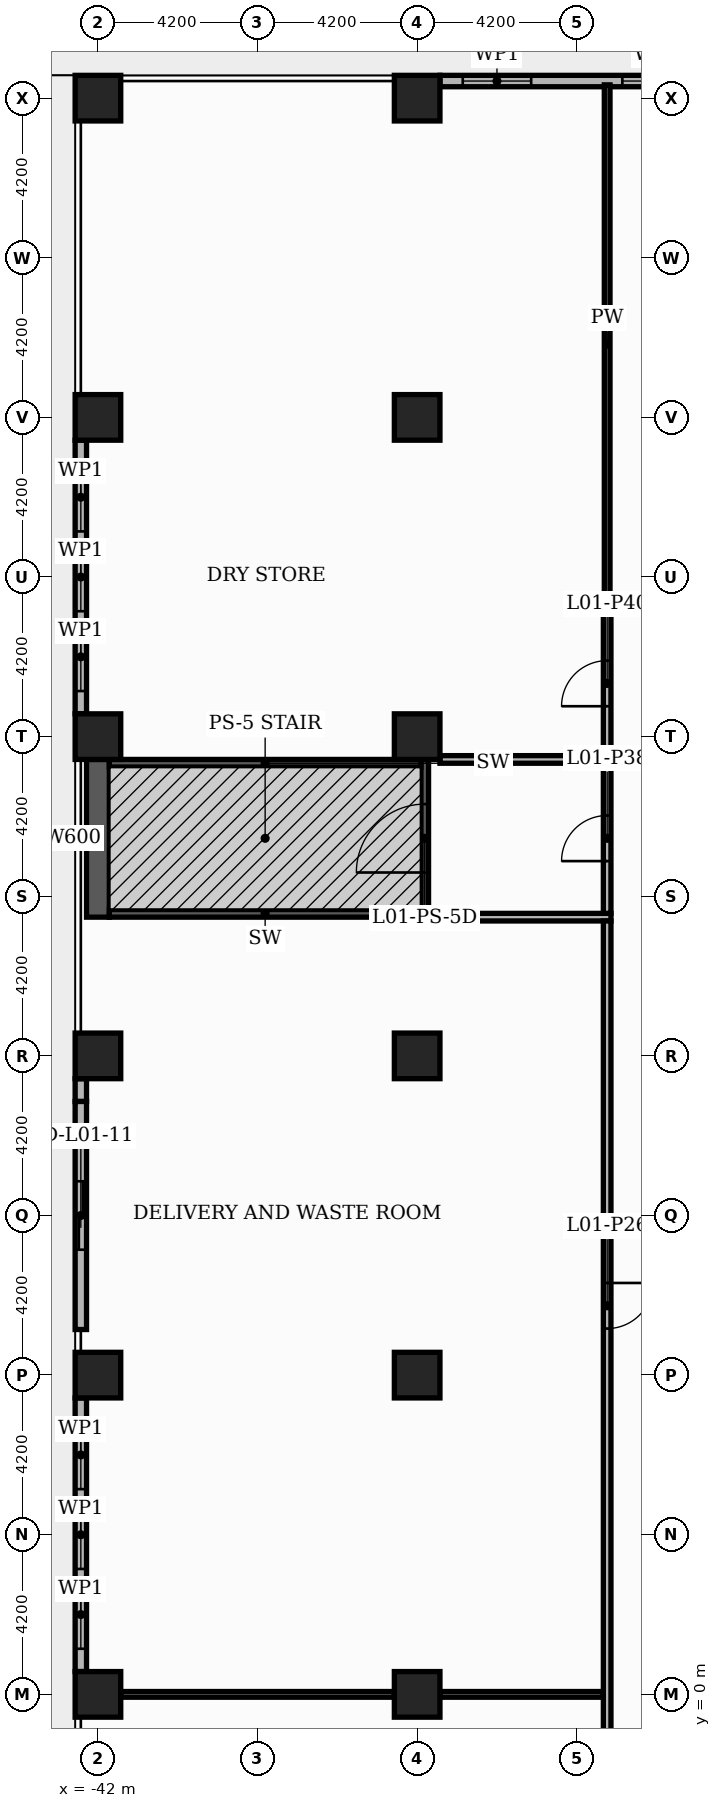
"""IFC4 building model, lengths in metres.
Left out: names, types, materials, properties, quantities, classifications, styles, units other than length and angle.
Written with IfcOpenShell. Run it as: python <this file> out.ifc"""

import sys

from ifc_helpers import new_model, si_unit, direction, frame, frame_2d, origin, origin_2d, place, context, subcontext, project, spatial, rectangle, extrude, element, fill, save


model = new_model("IFC4")
c1 = context("Model", 3, precision=1e-05, world=origin(), true_north=direction((0.0, 1.0)))
c2 = subcontext(c1, "Body", "Model", "MODEL_VIEW")
j1 = project(units=[si_unit("LENGTHUNIT", "METRE"), si_unit("PLANEANGLEUNIT", "RADIAN")], contexts=[c1])
p1 = place(None, origin())
s1 = spatial("IfcSite", under=j1, at=p1, CompositionType="ELEMENT")
p2 = place(p1, origin())
s2 = spatial("IfcBuilding", under=s1, at=p2, CompositionType="ELEMENT")
p3 = place(p2, frame((0.0, 0.0, 7.2)))
s3 = spatial("IfcBuildingStorey", under=s2, at=p3, CompositionType="ELEMENT", Elevation=7.2)
for number, where, z_axis, x_axis in (
    (1, (-33.6, 0.0, 0.0), (0.0, 0.0, 1.0), (1.0, 0.0, 0.0)),
    (2, (-33.6, 8.4, 0.0), (0.0, 0.0, 1.0), (1.0, 0.0, 0.0)),
    (3, (-33.6, 16.8, 0.0), (0.0, 0.0, 1.0), (1.0, 0.0, 0.0)),
    (4, (-33.6, 25.2, 0.0), (0.0, 0.0, 1.0), (1.0, 0.0, 0.0)),
    (5, (-33.6, 33.6, 0.0), (0.0, 0.0, 1.0), (1.0, 0.0, 0.0)),
    (6, (-33.6, 42.0, 0.0), (0.0, 0.0, 1.0), (1.0, 0.0, 0.0)),
    (7, (-42.0, 0.0, 0.0), (0.0, 0.0, 1.0), (1.0, 0.0, 0.0)),
    (8, (-42.0, 8.4, 0.0), (0.0, 0.0, 1.0), (1.0, 0.0, 0.0)),
    (9, (-42.0, 16.8, 0.0), (0.0, 0.0, 1.0), (1.0, 0.0, 0.0)),
    (10, (-42.0, 25.2, 0.0), (0.0, 0.0, 1.0), (1.0, 0.0, 0.0)),
    (11, (-42.0, 33.6, 0.0), (0.0, 0.0, 1.0), (1.0, 0.0, 0.0)),
    (12, (-42.0, 42.0, 0.0), (0.0, 0.0, 1.0), (1.0, 0.0, 0.0)),
):
    element("IfcColumn", number, at=place(p3, frame(where, z_axis=z_axis, x_axis=x_axis)), inside=s3, PredefinedType="COLUMN", context=c2, shape_type="SweptSolid", body=[
        extrude(rectangle(XDim=1.2, YDim=1.2, at=origin_2d()), origin(), (0.0, 0.0, 1.0), 4.8),
    ])
p4 = place(p3, frame((-25.8, 42.45, 0.0), z_axis=(0.0, 0.0, 1.0), x_axis=(-1.0, 0.0, 0.0)))
e13 = element("IfcWall", 13, at=p4, inside=s3, PredefinedType="STANDARD", context=c2, shape_type="SweptSolid", body=[
    extrude(rectangle(XDim=7.2, YDim=0.3, at=frame_2d((3.6, 0.0))), origin(), (0.0, 0.0, 1.0), 4.38),
])
p5 = place(p4, frame((0.6, 0.0, 0.6)))
e14 = element("IfcOpeningElement", 14, at=p5, cuts=e13, PredefinedType="OPENING", context=c2, shape_type="SweptSolid", body=[
    extrude(rectangle(XDim=1.8, YDim=3.0, at=frame_2d((0.9, 1.5))), frame((0.0, 0.16, 0.0), z_axis=(0.0, -1.0, 0.0), x_axis=(1.0, 0.0, 0.0)), (0.0, 0.0, 1.0), 0.32),
])
p6 = place(p4, frame((4.8, 0.0, 0.6)))
e15 = element("IfcOpeningElement", 15, at=p6, cuts=e13, PredefinedType="OPENING", context=c2, shape_type="SweptSolid", body=[
    extrude(rectangle(XDim=1.8, YDim=3.0, at=frame_2d((0.9, 1.5))), frame((0.0, 0.16, 0.0), z_axis=(0.0, -1.0, 0.0), x_axis=(1.0, 0.0, 0.0)), (0.0, 0.0, 1.0), 0.32),
])
p7 = place(p3, frame((-42.45, 33.0, 0.0), z_axis=(0.0, 0.0, 1.0), x_axis=(0.0, -1.0, 0.0)))
e16 = element("IfcWall", 16, at=p7, inside=s3, PredefinedType="STANDARD", context=c2, shape_type="SweptSolid", body=[
    extrude(rectangle(XDim=7.2, YDim=0.3, at=frame_2d((3.6, 0.0))), origin(), (0.0, 0.0, 1.0), 4.38),
])
p8 = place(p7, frame((0.6, 0.0, 0.6)))
e17 = element("IfcOpeningElement", 17, at=p8, cuts=e16, PredefinedType="OPENING", context=c2, shape_type="SweptSolid", body=[
    extrude(rectangle(XDim=1.8, YDim=3.0, at=frame_2d((0.9, 1.5))), frame((0.0, 0.16, 0.0), z_axis=(0.0, -1.0, 0.0), x_axis=(1.0, 0.0, 0.0)), (0.0, 0.0, 1.0), 0.32),
])
p9 = place(p7, frame((2.7, 0.0, 0.6)))
e18 = element("IfcOpeningElement", 18, at=p9, cuts=e16, PredefinedType="OPENING", context=c2, shape_type="SweptSolid", body=[
    extrude(rectangle(XDim=1.8, YDim=3.0, at=frame_2d((0.9, 1.5))), frame((0.0, 0.16, 0.0), z_axis=(0.0, -1.0, 0.0), x_axis=(1.0, 0.0, 0.0)), (0.0, 0.0, 1.0), 0.32),
])
p10 = place(p7, frame((4.8, 0.0, 0.6)))
e19 = element("IfcOpeningElement", 19, at=p10, cuts=e16, PredefinedType="OPENING", context=c2, shape_type="SweptSolid", body=[
    extrude(rectangle(XDim=1.8, YDim=3.0, at=frame_2d((0.9, 1.5))), frame((0.0, 0.16, 0.0), z_axis=(0.0, -1.0, 0.0), x_axis=(1.0, 0.0, 0.0)), (0.0, 0.0, 1.0), 0.32),
])
p11 = place(p3, frame((-42.45, 16.2, 0.0), z_axis=(0.0, 0.0, 1.0), x_axis=(0.0, -1.0, 0.0)))
e20 = element("IfcWall", 20, at=p11, inside=s3, PredefinedType="STANDARD", context=c2, shape_type="SweptSolid", body=[
    extrude(rectangle(XDim=0.6, YDim=0.3, at=frame_2d((0.3, 0.0))), origin(), (0.0, 0.0, 1.0), 4.38),
])
p12 = place(p3, frame((-42.45, 15.6, 0.0), z_axis=(0.0, 0.0, 1.0), x_axis=(0.0, -1.0, 0.0)))
e21 = element("IfcWall", 21, at=p12, inside=s3, PredefinedType="STANDARD", context=c2, shape_type="SweptSolid", body=[
    extrude(rectangle(XDim=6.0, YDim=0.3, at=frame_2d((3.0, 0.0))), origin(), (0.0, 0.0, 1.0), 4.38),
])
p13 = place(p12, frame((2.1, 0.0, 0.0)))
e22 = element("IfcOpeningElement", 22, at=p13, cuts=e21, PredefinedType="OPENING", context=c2, shape_type="SweptSolid", body=[
    extrude(rectangle(XDim=1.8, YDim=2.4, at=frame_2d((0.9, 1.2))), frame((0.0, 0.16, 0.0), z_axis=(0.0, -1.0, 0.0), x_axis=(1.0, 0.0, 0.0)), (0.0, 0.0, 1.0), 0.32),
])
p14 = place(p3, frame((-42.45, 7.8, 0.0), z_axis=(0.0, 0.0, 1.0), x_axis=(0.0, -1.0, 0.0)))
e23 = element("IfcWall", 23, at=p14, inside=s3, PredefinedType="STANDARD", context=c2, shape_type="SweptSolid", body=[
    extrude(rectangle(XDim=7.2, YDim=0.3, at=frame_2d((3.6, 0.0))), origin(), (0.0, 0.0, 1.0), 4.38),
])
p15 = place(p14, frame((0.6, 0.0, 0.6)))
e24 = element("IfcOpeningElement", 24, at=p15, cuts=e23, PredefinedType="OPENING", context=c2, shape_type="SweptSolid", body=[
    extrude(rectangle(XDim=1.8, YDim=3.0, at=frame_2d((0.9, 1.5))), frame((0.0, 0.16, 0.0), z_axis=(0.0, -1.0, 0.0), x_axis=(1.0, 0.0, 0.0)), (0.0, 0.0, 1.0), 0.32),
])
p16 = place(p14, frame((2.7, 0.0, 0.6)))
e25 = element("IfcOpeningElement", 25, at=p16, cuts=e23, PredefinedType="OPENING", context=c2, shape_type="SweptSolid", body=[
    extrude(rectangle(XDim=1.8, YDim=3.0, at=frame_2d((0.9, 1.5))), frame((0.0, 0.16, 0.0), z_axis=(0.0, -1.0, 0.0), x_axis=(1.0, 0.0, 0.0)), (0.0, 0.0, 1.0), 0.32),
])
p17 = place(p14, frame((4.8, 0.0, 0.6)))
e26 = element("IfcOpeningElement", 26, at=p17, cuts=e23, PredefinedType="OPENING", context=c2, shape_type="SweptSolid", body=[
    extrude(rectangle(XDim=1.8, YDim=3.0, at=frame_2d((0.9, 1.5))), frame((0.0, 0.16, 0.0), z_axis=(0.0, -1.0, 0.0), x_axis=(1.0, 0.0, 0.0)), (0.0, 0.0, 1.0), 0.32),
])
p18 = place(p3, frame((-41.4, 0.0, 0.0), z_axis=(0.0, 0.0, 1.0), x_axis=(1.0, 0.0, 0.0)))
e27 = element("IfcWall", 27, at=p18, inside=s3, PredefinedType="PARTITIONING", context=c2, shape_type="SweptSolid", body=[
    extrude(rectangle(XDim=7.2, YDim=0.15, at=frame_2d((3.6, 0.0))), origin(), (0.0, 0.0, 1.0), 4.08),
])
p19 = place(p3, frame((-33.0, 0.0, 0.0), z_axis=(0.0, 0.0, 1.0), x_axis=(1.0, 0.0, 0.0)))
e28 = element("IfcWall", 28, at=p19, inside=s3, PredefinedType="PARTITIONING", context=c2, shape_type="SweptSolid", body=[
    extrude(rectangle(XDim=4.3, YDim=0.15, at=frame_2d((2.15, 0.0))), origin(), (0.0, 0.0, 1.0), 4.08),
])
p20 = place(p3, frame((-33.3, 20.45, 0.0), z_axis=(0.0, 0.0, 1.0), x_axis=(1.0, 0.0, 0.0)))
e29 = element("IfcWall", 29, at=p20, inside=s3, PredefinedType="PARTITIONING", context=c2, shape_type="SweptSolid", body=[
    extrude(rectangle(XDim=4.8, YDim=0.2, at=frame_2d((2.4, 0.0))), origin(), (0.0, 0.0, 1.0), 4.38),
])
p21 = place(p3, frame((-33.0, 24.6, 0.0), z_axis=(0.0, 0.0, 1.0), x_axis=(1.0, 0.0, 0.0)))
e30 = element("IfcWall", 30, at=p21, inside=s3, PredefinedType="PARTITIONING", context=c2, shape_type="SweptSolid", body=[
    extrude(rectangle(XDim=4.5, YDim=0.2, at=frame_2d((2.25, 0.0))), origin(), (0.0, 0.0, 1.0), 4.38),
])
p22 = place(p3, frame((-28.7, 28.6, 0.0), z_axis=(0.0, 0.0, 1.0), x_axis=(1.0, 0.0, 0.0)))
e31 = element("IfcWall", 31, at=p22, inside=s3, PredefinedType="PARTITIONING", context=c2, shape_type="SweptSolid", body=[
    extrude(rectangle(XDim=57.4, YDim=0.2, at=frame_2d((28.7, 0.0))), origin(), (0.0, 0.0, 1.0), 3.98),
])
p23 = place(p22, frame((9.6, 0.0, 0.0)))
e32 = element("IfcOpeningElement", 32, at=p23, cuts=e31, PredefinedType="OPENING", context=c2, shape_type="SweptSolid", body=[
    extrude(rectangle(XDim=1.2, YDim=2.2, at=frame_2d((0.6, 1.1))), frame((0.0, 0.11, 0.0), z_axis=(0.0, -1.0, 0.0), x_axis=(1.0, 0.0, 0.0)), (0.0, 0.0, 1.0), 0.22),
])
p24 = place(p22, frame((28.1, 0.0, 0.0)))
e33 = element("IfcOpeningElement", 33, at=p24, cuts=e31, PredefinedType="OPENING", context=c2, shape_type="SweptSolid", body=[
    extrude(rectangle(XDim=1.2, YDim=2.2, at=frame_2d((0.6, 1.1))), frame((0.0, 0.11, 0.0), z_axis=(0.0, -1.0, 0.0), x_axis=(1.0, 0.0, 0.0)), (0.0, 0.0, 1.0), 0.22),
])
p25 = place(p22, frame((46.6, 0.0, 0.0)))
e34 = element("IfcOpeningElement", 34, at=p25, cuts=e31, PredefinedType="OPENING", context=c2, shape_type="SweptSolid", body=[
    extrude(rectangle(XDim=1.2, YDim=2.2, at=frame_2d((0.6, 1.1))), frame((0.0, 0.11, 0.0), z_axis=(0.0, -1.0, 0.0), x_axis=(1.0, 0.0, 0.0)), (0.0, 0.0, 1.0), 0.22),
])
p26 = place(p3, frame((-28.6, -20.35, 0.0), z_axis=(0.0, 0.0, 1.0), x_axis=(0.0, 1.0, 0.0)))
e35 = element("IfcWall", 35, at=p26, inside=s3, PredefinedType="PARTITIONING", context=c2, shape_type="SweptSolid", body=[
    extrude(rectangle(XDim=40.7, YDim=0.2, at=frame_2d((20.35, 0.0))), origin(), (0.0, 0.0, 1.0), 4.08),
])
p27 = place(p26, frame((9.525, 0.0, 0.0)))
e36 = element("IfcOpeningElement", 36, at=p27, cuts=e35, PredefinedType="OPENING", context=c2, shape_type="SweptSolid", body=[
    extrude(rectangle(XDim=1.2, YDim=2.2, at=frame_2d((0.6, 1.1))), frame((0.0, 0.11, 0.0), z_axis=(0.0, -1.0, 0.0), x_axis=(1.0, 0.0, 0.0)), (0.0, 0.0, 1.0), 0.22),
])
p28 = place(p26, frame((29.975, 0.0, 0.0)))
e37 = element("IfcOpeningElement", 37, at=p28, cuts=e35, PredefinedType="OPENING", context=c2, shape_type="SweptSolid", body=[
    extrude(rectangle(XDim=1.2, YDim=2.2, at=frame_2d((0.6, 1.1))), frame((0.0, 0.11, 0.0), z_axis=(0.0, -1.0, 0.0), x_axis=(1.0, 0.0, 0.0)), (0.0, 0.0, 1.0), 0.22),
])
p29 = place(p3, frame((-28.6, 20.55, 0.0), z_axis=(0.0, 0.0, 1.0), x_axis=(0.0, 1.0, 0.0)))
e38 = element("IfcWall", 38, at=p29, inside=s3, PredefinedType="PARTITIONING", context=c2, shape_type="SweptSolid", body=[
    extrude(rectangle(XDim=3.95, YDim=0.2, at=frame_2d((1.975, 0.0))), origin(), (0.0, 0.0, 1.0), 4.38),
])
p30 = place(p29, frame((1.375, 0.0, 0.0)))
e39 = element("IfcOpeningElement", 39, at=p30, cuts=e38, PredefinedType="OPENING", context=c2, shape_type="SweptSolid", body=[
    extrude(rectangle(XDim=1.2, YDim=2.2, at=frame_2d((0.6, 1.1))), frame((0.0, 0.11, 0.0), z_axis=(0.0, -1.0, 0.0), x_axis=(1.0, 0.0, 0.0)), (0.0, 0.0, 1.0), 0.22),
])
p31 = place(p3, frame((-28.6, 24.7, 0.0), z_axis=(0.0, 0.0, 1.0), x_axis=(0.0, 1.0, 0.0)))
e40 = element("IfcWall", 40, at=p31, inside=s3, PredefinedType="PARTITIONING", context=c2, shape_type="SweptSolid", body=[
    extrude(rectangle(XDim=3.8, YDim=0.2, at=frame_2d((1.9, 0.0))), origin(), (0.0, 0.0, 1.0), 4.08),
])
p32 = place(p31, frame((1.3, 0.0, 0.0)))
e41 = element("IfcOpeningElement", 41, at=p32, cuts=e40, PredefinedType="OPENING", context=c2, shape_type="SweptSolid", body=[
    extrude(rectangle(XDim=1.2, YDim=2.2, at=frame_2d((0.6, 1.1))), frame((0.0, 0.11, 0.0), z_axis=(0.0, -1.0, 0.0), x_axis=(1.0, 0.0, 0.0)), (0.0, 0.0, 1.0), 0.22),
])
p33 = place(p3, frame((-28.6, 28.7, 0.0), z_axis=(0.0, 0.0, 1.0), x_axis=(0.0, 1.0, 0.0)))
e42 = element("IfcWall", 42, at=p33, inside=s3, PredefinedType="PARTITIONING", context=c2, shape_type="SweptSolid", body=[
    extrude(rectangle(XDim=13.65, YDim=0.15, at=frame_2d((6.825, 0.0))), origin(), (0.0, 0.0, 1.0), 4.08),
])
p34 = place(p3, frame((-42.0, 20.45, 0.0), z_axis=(0.0, 0.0, 1.0), x_axis=(0.0, 1.0, 0.0)))
e43 = element("IfcWall", 43, at=p34, inside=s3, PredefinedType="SOLIDWALL", context=c2, shape_type="SweptSolid", body=[
    extrude(rectangle(XDim=4.15, YDim=0.6, at=frame_2d((2.075, 0.0))), origin(), (0.0, 0.0, 1.0), 3.98),
])
p35 = place(p3, frame((-33.4, 20.45, 0.0), z_axis=(0.0, 0.0, 1.0), x_axis=(0.0, 1.0, 0.0)))
e44 = element("IfcWall", 44, at=p35, inside=s3, PredefinedType="SOLIDWALL", context=c2, shape_type="SweptSolid", body=[
    extrude(rectangle(XDim=4.15, YDim=0.2, at=frame_2d((2.075, 0.0))), origin(), (0.0, 0.0, 1.0), 3.98),
])
p36 = place(p35, frame((1.175, 0.0, 0.0)))
e45 = element("IfcOpeningElement", 45, at=p36, cuts=e44, PredefinedType="OPENING", context=c2, shape_type="SweptSolid", body=[
    extrude(rectangle(XDim=1.8, YDim=2.2, at=frame_2d((0.9, 1.1))), frame((0.0, 0.11, 0.0), z_axis=(0.0, -1.0, 0.0), x_axis=(1.0, 0.0, 0.0)), (0.0, 0.0, 1.0), 0.22),
])
for number, where, z_axis, x_axis in (
    (46, (-41.7, 20.55, 0.0), (0.0, 0.0, 1.0), (1.0, 0.0, 0.0)),
    (47, (-41.7, 24.5, 0.0), (0.0, 0.0, 1.0), (1.0, 0.0, 0.0)),
):
    element("IfcWall", number, at=place(p3, frame(where, z_axis=z_axis, x_axis=x_axis)), inside=s3, PredefinedType="SOLIDWALL", context=c2, shape_type="SweptSolid", body=[
        extrude(rectangle(XDim=8.2, YDim=0.2, at=frame_2d((4.1, 0.0))), origin(), (0.0, 0.0, 1.0), 4.6),
    ])
p37 = place(p5, origin())
e48 = element("IfcWindow", 48, at=p37, inside=s3, PartitioningType="SINGLE_PANEL", PredefinedType="WINDOW", context=c2, shape_type="SweptSolid", body=[
    extrude(rectangle(XDim=1.8, YDim=3.0, at=frame_2d((0.9, 1.5))), frame((0.0, 0.03, 0.0), z_axis=(0.0, -1.0, 0.0), x_axis=(1.0, 0.0, 0.0)), (0.0, 0.0, 1.0), 0.06),
])
fill(e14, e48)
p38 = place(p6, origin())
e49 = element("IfcWindow", 49, at=p38, inside=s3, PartitioningType="SINGLE_PANEL", PredefinedType="WINDOW", context=c2, shape_type="SweptSolid", body=[
    extrude(rectangle(XDim=1.8, YDim=3.0, at=frame_2d((0.9, 1.5))), frame((0.0, 0.03, 0.0), z_axis=(0.0, -1.0, 0.0), x_axis=(1.0, 0.0, 0.0)), (0.0, 0.0, 1.0), 0.06),
])
fill(e15, e49)
p39 = place(p8, origin())
e50 = element("IfcWindow", 50, at=p39, inside=s3, PartitioningType="SINGLE_PANEL", PredefinedType="WINDOW", context=c2, shape_type="SweptSolid", body=[
    extrude(rectangle(XDim=1.8, YDim=3.0, at=frame_2d((0.9, 1.5))), frame((0.0, 0.03, 0.0), z_axis=(0.0, -1.0, 0.0), x_axis=(1.0, 0.0, 0.0)), (0.0, 0.0, 1.0), 0.06),
])
fill(e17, e50)
p40 = place(p9, origin())
e51 = element("IfcWindow", 51, at=p40, inside=s3, PartitioningType="SINGLE_PANEL", PredefinedType="WINDOW", context=c2, shape_type="SweptSolid", body=[
    extrude(rectangle(XDim=1.8, YDim=3.0, at=frame_2d((0.9, 1.5))), frame((0.0, 0.03, 0.0), z_axis=(0.0, -1.0, 0.0), x_axis=(1.0, 0.0, 0.0)), (0.0, 0.0, 1.0), 0.06),
])
fill(e18, e51)
p41 = place(p10, origin())
e52 = element("IfcWindow", 52, at=p41, inside=s3, PartitioningType="SINGLE_PANEL", PredefinedType="WINDOW", context=c2, shape_type="SweptSolid", body=[
    extrude(rectangle(XDim=1.8, YDim=3.0, at=frame_2d((0.9, 1.5))), frame((0.0, 0.03, 0.0), z_axis=(0.0, -1.0, 0.0), x_axis=(1.0, 0.0, 0.0)), (0.0, 0.0, 1.0), 0.06),
])
fill(e19, e52)
p42 = place(p13, origin())
e53 = element("IfcDoor", 53, at=p42, inside=s3, OperationType="SLIDING_TO_RIGHT", PredefinedType="DOOR", context=c2, shape_type="SweptSolid", body=[
    extrude(rectangle(XDim=1.8, YDim=2.4, at=frame_2d((0.9, 1.2))), frame((0.0, 0.025, 0.0), z_axis=(0.0, -1.0, 0.0), x_axis=(1.0, 0.0, 0.0)), (0.0, 0.0, 1.0), 0.05),
])
fill(e22, e53)
p43 = place(p15, origin())
e54 = element("IfcWindow", 54, at=p43, inside=s3, PartitioningType="SINGLE_PANEL", PredefinedType="WINDOW", context=c2, shape_type="SweptSolid", body=[
    extrude(rectangle(XDim=1.8, YDim=3.0, at=frame_2d((0.9, 1.5))), frame((0.0, 0.03, 0.0), z_axis=(0.0, -1.0, 0.0), x_axis=(1.0, 0.0, 0.0)), (0.0, 0.0, 1.0), 0.06),
])
fill(e24, e54)
p44 = place(p16, origin())
e55 = element("IfcWindow", 55, at=p44, inside=s3, PartitioningType="SINGLE_PANEL", PredefinedType="WINDOW", context=c2, shape_type="SweptSolid", body=[
    extrude(rectangle(XDim=1.8, YDim=3.0, at=frame_2d((0.9, 1.5))), frame((0.0, 0.03, 0.0), z_axis=(0.0, -1.0, 0.0), x_axis=(1.0, 0.0, 0.0)), (0.0, 0.0, 1.0), 0.06),
])
fill(e25, e55)
p45 = place(p17, origin())
e56 = element("IfcWindow", 56, at=p45, inside=s3, PartitioningType="SINGLE_PANEL", PredefinedType="WINDOW", context=c2, shape_type="SweptSolid", body=[
    extrude(rectangle(XDim=1.8, YDim=3.0, at=frame_2d((0.9, 1.5))), frame((0.0, 0.03, 0.0), z_axis=(0.0, -1.0, 0.0), x_axis=(1.0, 0.0, 0.0)), (0.0, 0.0, 1.0), 0.06),
])
fill(e26, e56)
p46 = place(p28, origin())
e57 = element("IfcDoor", 57, at=p46, inside=s3, OperationType="SINGLE_SWING_RIGHT", PredefinedType="DOOR", context=c2, shape_type="SweptSolid", body=[
    extrude(rectangle(XDim=1.2, YDim=2.2, at=frame_2d((0.6, 1.1))), frame((0.0, 0.025, 0.0), z_axis=(0.0, -1.0, 0.0), x_axis=(1.0, 0.0, 0.0)), (0.0, 0.0, 1.0), 0.05),
])
fill(e37, e57)
p47 = place(p30, origin())
e58 = element("IfcDoor", 58, at=p47, inside=s3, OperationType="SINGLE_SWING_LEFT", PredefinedType="DOOR", context=c2, shape_type="SweptSolid", body=[
    extrude(rectangle(XDim=1.2, YDim=2.2, at=frame_2d((0.6, 1.1))), frame((0.0, 0.025, 0.0), z_axis=(0.0, -1.0, 0.0), x_axis=(1.0, 0.0, 0.0)), (0.0, 0.0, 1.0), 0.05),
])
fill(e39, e58)
p48 = place(p32, origin())
e59 = element("IfcDoor", 59, at=p48, inside=s3, OperationType="SINGLE_SWING_LEFT", PredefinedType="DOOR", context=c2, shape_type="SweptSolid", body=[
    extrude(rectangle(XDim=1.2, YDim=2.2, at=frame_2d((0.6, 1.1))), frame((0.0, 0.025, 0.0), z_axis=(0.0, -1.0, 0.0), x_axis=(1.0, 0.0, 0.0)), (0.0, 0.0, 1.0), 0.05),
])
fill(e41, e59)
p49 = place(p36, origin())
e60 = element("IfcDoor", 60, at=p49, inside=s3, OperationType="DOUBLE_DOOR_SINGLE_SWING", PredefinedType="DOOR", context=c2, shape_type="SweptSolid", body=[
    extrude(rectangle(XDim=1.8, YDim=2.2, at=frame_2d((0.9, 1.1))), frame((0.0, 0.025, 0.0), z_axis=(0.0, -1.0, 0.0), x_axis=(1.0, 0.0, 0.0)), (0.0, 0.0, 1.0), 0.05),
])
fill(e45, e60)
save(model, sys.argv[1])
